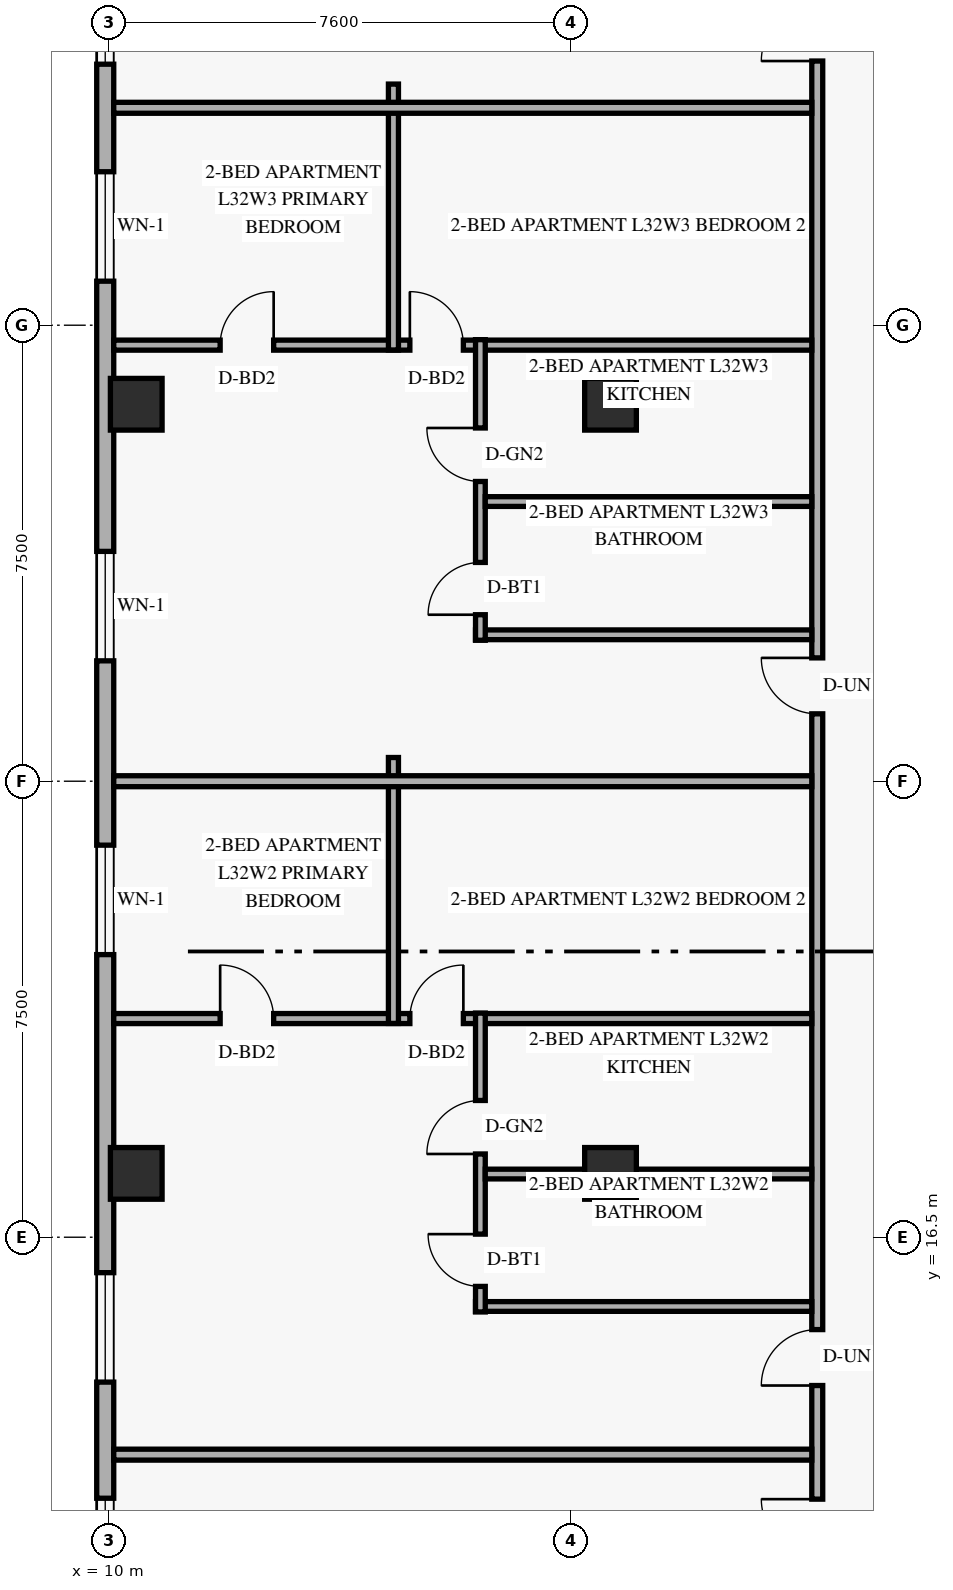
"""IFC4 building model, lengths in metres.
Left out: names, types, materials, properties, quantities, classifications, styles, units other than length and angle.
Written with IfcOpenShell. Run it as: python <this file> out.ifc"""

import sys

from ifc_helpers import new_model, si_unit, direction, frame, frame_2d, origin, origin_2d, place, context, subcontext, project, spatial, rectangle, extrude, element, fill, save


model = new_model("IFC4")
c1 = context("Model", 3, precision=1e-05, world=origin(), true_north=direction((0.0, 1.0)))
c2 = subcontext(c1, "Body", "Model", "MODEL_VIEW")
j1 = project(units=[si_unit("LENGTHUNIT", "METRE"), si_unit("PLANEANGLEUNIT", "RADIAN")], contexts=[c1])
p1 = place(None, origin())
s1 = spatial("IfcSite", under=j1, at=p1, CompositionType="ELEMENT")
p2 = place(p1, origin())
s2 = spatial("IfcBuilding", under=s1, at=p2, CompositionType="ELEMENT")
p3 = place(p2, frame((0.0, 0.0, 124.8)))
s3 = spatial("IfcBuildingStorey", under=s2, at=p3, CompositionType="ELEMENT", Elevation=124.8)
for number, where, z_axis, x_axis in (
    (1, (10.45, 17.55, 0.0), (0.0, 0.0, 1.0), (1.0, 0.0, 0.0)),
    (2, (10.45, 30.2, 0.0), (0.0, 0.0, 1.0), (1.0, 0.0, 0.0)),
    (3, (18.25, 17.55, 0.0), (0.0, 0.0, 1.0), (1.0, 0.0, 0.0)),
    (4, (18.25, 30.2, 0.0), (0.0, 0.0, 1.0), (1.0, 0.0, 0.0)),
):
    element("IfcColumn", number, at=place(p3, frame(where, z_axis=z_axis, x_axis=x_axis)), inside=s3, PredefinedType="COLUMN", context=c2, shape_type="SweptSolid", body=[
        extrude(rectangle(XDim=0.85, YDim=0.85, at=origin_2d()), origin(), (0.0, 0.0, 1.0), 3.6),
    ])
p4 = place(p3, frame((9.94, 41.68, 0.0), z_axis=(0.0, 0.0, 1.0), x_axis=(0.0, -1.0, 0.0)))
e5 = element("IfcWall", 5, at=p4, inside=s3, PredefinedType="SOLIDWALL", context=c2, shape_type="SweptSolid", body=[
    extrude(rectangle(XDim=35.36, YDim=0.28, at=frame_2d((17.68, 0.0))), origin(), (0.0, 0.0, 1.0), 3.36),
])
p5 = place(p4, frame((29.473, 0.0, 0.85)))
e6 = element("IfcOpeningElement", 6, at=p5, cuts=e5, PredefinedType="OPENING", context=c2, shape_type="SweptSolid", body=[
    extrude(rectangle(XDim=1.8, YDim=1.6, at=frame_2d((0.9, 0.8))), frame((0.0, 0.15, 0.0), z_axis=(0.0, -1.0, 0.0), x_axis=(1.0, 0.0, 0.0)), (0.0, 0.0, 1.0), 0.3),
])
p6 = place(p4, frame((25.763, 0.0, 0.85)))
e7 = element("IfcOpeningElement", 7, at=p6, cuts=e5, PredefinedType="OPENING", context=c2, shape_type="SweptSolid", body=[
    extrude(rectangle(XDim=1.8, YDim=1.6, at=frame_2d((0.9, 0.8))), frame((0.0, 0.15, 0.0), z_axis=(0.0, -1.0, 0.0), x_axis=(1.0, 0.0, 0.0)), (0.0, 0.0, 1.0), 0.3),
])
p7 = place(p4, frame((18.732, 0.0, 0.85)))
e8 = element("IfcOpeningElement", 8, at=p7, cuts=e5, PredefinedType="OPENING", context=c2, shape_type="SweptSolid", body=[
    extrude(rectangle(XDim=1.8, YDim=1.6, at=frame_2d((0.9, 0.8))), frame((0.0, 0.15, 0.0), z_axis=(0.0, -1.0, 0.0), x_axis=(1.0, 0.0, 0.0)), (0.0, 0.0, 1.0), 0.3),
])
p8 = place(p4, frame((13.9, 0.0, 0.85)))
e9 = element("IfcOpeningElement", 9, at=p8, cuts=e5, PredefinedType="OPENING", context=c2, shape_type="SweptSolid", body=[
    extrude(rectangle(XDim=1.8, YDim=1.6, at=frame_2d((0.9, 0.8))), frame((0.0, 0.15, 0.0), z_axis=(0.0, -1.0, 0.0), x_axis=(1.0, 0.0, 0.0)), (0.0, 0.0, 1.0), 0.3),
])
p9 = place(p4, frame((7.656, 0.0, 0.85)))
e10 = element("IfcOpeningElement", 10, at=p9, cuts=e5, PredefinedType="OPENING", context=c2, shape_type="SweptSolid", body=[
    extrude(rectangle(XDim=1.8, YDim=1.6, at=frame_2d((0.9, 0.8))), frame((0.0, 0.15, 0.0), z_axis=(0.0, -1.0, 0.0), x_axis=(1.0, 0.0, 0.0)), (0.0, 0.0, 1.0), 0.3),
])
p10 = place(p4, frame((4.087, 0.0, 0.85)))
e11 = element("IfcOpeningElement", 11, at=p10, cuts=e5, PredefinedType="OPENING", context=c2, shape_type="SweptSolid", body=[
    extrude(rectangle(XDim=1.8, YDim=1.6, at=frame_2d((0.9, 0.8))), frame((0.0, 0.15, 0.0), z_axis=(0.0, -1.0, 0.0), x_axis=(1.0, 0.0, 0.0)), (0.0, 0.0, 1.0), 0.3),
])
p11 = place(p3, frame((21.65, 6.8, 0.0), z_axis=(0.0, 0.0, 1.0), x_axis=(0.0, 1.0, 0.0)))
e12 = element("IfcWall", 12, at=p11, inside=s3, PredefinedType="STANDARD", context=c2, shape_type="SweptSolid", body=[
    extrude(rectangle(XDim=34.4, YDim=0.18, at=frame_2d((17.2, 0.0))), origin(), (0.0, 0.0, 1.0), 2.731),
])
p12 = place(p11, frame((4.472, 0.0, 0.0)))
e13 = element("IfcOpeningElement", 13, at=p12, cuts=e12, PredefinedType="OPENING", context=c2, shape_type="SweptSolid", body=[
    extrude(rectangle(XDim=0.92, YDim=2.15, at=frame_2d((0.46, 1.075))), frame((0.0, 0.1, 0.0), z_axis=(0.0, -1.0, 0.0), x_axis=(1.0, 0.0, 0.0)), (0.0, 0.0, 1.0), 0.2),
])
p13 = place(p11, frame((7.261, 0.0, 0.0)))
e14 = element("IfcOpeningElement", 14, at=p13, cuts=e12, PredefinedType="OPENING", context=c2, shape_type="SweptSolid", body=[
    extrude(rectangle(XDim=0.92, YDim=2.15, at=frame_2d((0.46, 1.075))), frame((0.0, 0.1, 0.0), z_axis=(0.0, -1.0, 0.0), x_axis=(1.0, 0.0, 0.0)), (0.0, 0.0, 1.0), 0.2),
])
p14 = place(p11, frame((18.308, 0.0, 0.0)))
e15 = element("IfcOpeningElement", 15, at=p14, cuts=e12, PredefinedType="OPENING", context=c2, shape_type="SweptSolid", body=[
    extrude(rectangle(XDim=0.92, YDim=2.15, at=frame_2d((0.46, 1.075))), frame((0.0, 0.1, 0.0), z_axis=(0.0, -1.0, 0.0), x_axis=(1.0, 0.0, 0.0)), (0.0, 0.0, 1.0), 0.2),
])
p15 = place(p11, frame((29.045, 0.0, 0.0)))
e16 = element("IfcOpeningElement", 16, at=p15, cuts=e12, PredefinedType="OPENING", context=c2, shape_type="SweptSolid", body=[
    extrude(rectangle(XDim=0.92, YDim=2.15, at=frame_2d((0.46, 1.075))), frame((0.0, 0.1, 0.0), z_axis=(0.0, -1.0, 0.0), x_axis=(1.0, 0.0, 0.0)), (0.0, 0.0, 1.0), 0.2),
])
p16 = place(p3, frame((10.08, 12.924, 0.0), z_axis=(0.0, 0.0, 1.0), x_axis=(1.0, 0.0, 0.0)))
e17 = element("IfcWall", 17, at=p16, inside=s3, PredefinedType="PARTITIONING", context=c2, shape_type="SweptSolid", body=[
    extrude(rectangle(XDim=11.48, YDim=0.18, at=frame_2d((5.74, 0.0))), origin(), (0.0, 0.0, 1.0), 2.731),
])
p17 = place(p3, frame((10.08, 20.096, 0.0), z_axis=(0.0, 0.0, 1.0), x_axis=(1.0, 0.0, 0.0)))
e18 = element("IfcWall", 18, at=p17, inside=s3, PredefinedType="PARTITIONING", context=c2, shape_type="SweptSolid", body=[
    extrude(rectangle(XDim=11.48, YDim=0.165, at=frame_2d((5.74, 0.0))), origin(), (0.0, 0.0, 1.0), 2.731),
])
p18 = place(p17, frame((1.75, 0.0, 0.0)))
e19 = element("IfcOpeningElement", 19, at=p18, cuts=e18, PredefinedType="OPENING", context=c2, shape_type="SweptSolid", body=[
    extrude(rectangle(XDim=0.88, YDim=2.14, at=frame_2d((0.44, 1.07))), frame((0.0, 0.093, 0.0), z_axis=(0.0, -1.0, 0.0), x_axis=(1.0, 0.0, 0.0)), (0.0, 0.0, 1.0), 0.185),
])
p19 = place(p17, frame((4.87, 0.0, 0.0)))
e20 = element("IfcOpeningElement", 20, at=p19, cuts=e18, PredefinedType="OPENING", context=c2, shape_type="SweptSolid", body=[
    extrude(rectangle(XDim=0.88, YDim=2.14, at=frame_2d((0.44, 1.07))), frame((0.0, 0.093, 0.0), z_axis=(0.0, -1.0, 0.0), x_axis=(1.0, 0.0, 0.0)), (0.0, 0.0, 1.0), 0.185),
])
p20 = place(p3, frame((16.03, 15.361, 0.0), z_axis=(0.0, 0.0, 1.0), x_axis=(1.0, 0.0, 0.0)))
e21 = element("IfcWall", 21, at=p20, inside=s3, PredefinedType="PLUMBINGWALL", context=c2, shape_type="SweptSolid", body=[
    extrude(rectangle(XDim=5.53, YDim=0.16, at=frame_2d((2.765, 0.0))), origin(), (0.0, 0.0, 1.0), 2.731),
])
p21 = place(p3, frame((16.11, 15.271, 0.0), z_axis=(0.0, 0.0, 1.0), x_axis=(0.0, 1.0, 0.0)))
e22 = element("IfcWall", 22, at=p21, inside=s3, PredefinedType="PLUMBINGWALL", context=c2, shape_type="SweptSolid", body=[
    extrude(rectangle(XDim=4.915, YDim=0.16, at=frame_2d((2.458, 0.0))), origin(), (0.0, 0.0, 1.0), 2.731),
])
p22 = place(p21, frame((0.42, 0.0, 0.0)))
e23 = element("IfcOpeningElement", 23, at=p22, cuts=e22, PredefinedType="OPENING", context=c2, shape_type="SweptSolid", body=[
    extrude(rectangle(XDim=0.86, YDim=2.12, at=frame_2d((0.43, 1.06))), frame((0.0, 0.09, 0.0), z_axis=(0.0, -1.0, 0.0), x_axis=(1.0, 0.0, 0.0)), (0.0, 0.0, 1.0), 0.18),
])
p23 = place(p21, frame((2.598, 0.0, 0.0)))
e24 = element("IfcOpeningElement", 24, at=p23, cuts=e22, PredefinedType="OPENING", context=c2, shape_type="SweptSolid", body=[
    extrude(rectangle(XDim=0.88, YDim=2.12, at=frame_2d((0.44, 1.06))), frame((0.0, 0.09, 0.0), z_axis=(0.0, -1.0, 0.0), x_axis=(1.0, 0.0, 0.0)), (0.0, 0.0, 1.0), 0.18),
])
p24 = place(p3, frame((16.19, 17.539, 0.0), z_axis=(0.0, 0.0, 1.0), x_axis=(1.0, 0.0, 0.0)))
e25 = element("IfcWall", 25, at=p24, inside=s3, PredefinedType="PLUMBINGWALL", context=c2, shape_type="SweptSolid", body=[
    extrude(rectangle(XDim=5.37, YDim=0.16, at=frame_2d((2.685, 0.0))), origin(), (0.0, 0.0, 1.0), 2.731),
])
p25 = place(p3, frame((14.68, 20.016, 0.0), z_axis=(0.0, 0.0, 1.0), x_axis=(0.0, 1.0, 0.0)))
e26 = element("IfcWall", 26, at=p25, inside=s3, PredefinedType="PARTITIONING", context=c2, shape_type="SweptSolid", body=[
    extrude(rectangle(XDim=4.374, YDim=0.165, at=frame_2d((2.187, 0.0))), origin(), (0.0, 0.0, 1.0), 3.36),
])
p26 = place(p3, frame((10.08, 24.0, 0.0), z_axis=(0.0, 0.0, 1.0), x_axis=(1.0, 0.0, 0.0)))
e27 = element("IfcWall", 27, at=p26, inside=s3, PredefinedType="PARTITIONING", context=c2, shape_type="SweptSolid", body=[
    extrude(rectangle(XDim=11.48, YDim=0.18, at=frame_2d((5.74, 0.0))), origin(), (0.0, 0.0, 1.0), 2.731),
])
p27 = place(p3, frame((10.08, 31.172, 0.0), z_axis=(0.0, 0.0, 1.0), x_axis=(1.0, 0.0, 0.0)))
e28 = element("IfcWall", 28, at=p27, inside=s3, PredefinedType="PARTITIONING", context=c2, shape_type="SweptSolid", body=[
    extrude(rectangle(XDim=11.48, YDim=0.165, at=frame_2d((5.74, 0.0))), origin(), (0.0, 0.0, 1.0), 2.731),
])
p28 = place(p27, frame((1.75, 0.0, 0.0)))
e29 = element("IfcOpeningElement", 29, at=p28, cuts=e28, PredefinedType="OPENING", context=c2, shape_type="SweptSolid", body=[
    extrude(rectangle(XDim=0.88, YDim=2.14, at=frame_2d((0.44, 1.07))), frame((0.0, 0.093, 0.0), z_axis=(0.0, -1.0, 0.0), x_axis=(1.0, 0.0, 0.0)), (0.0, 0.0, 1.0), 0.185),
])
p29 = place(p27, frame((4.87, 0.0, 0.0)))
e30 = element("IfcOpeningElement", 30, at=p29, cuts=e28, PredefinedType="OPENING", context=c2, shape_type="SweptSolid", body=[
    extrude(rectangle(XDim=0.88, YDim=2.14, at=frame_2d((0.44, 1.07))), frame((0.0, 0.093, 0.0), z_axis=(0.0, -1.0, 0.0), x_axis=(1.0, 0.0, 0.0)), (0.0, 0.0, 1.0), 0.185),
])
p30 = place(p3, frame((16.03, 26.408, 0.0), z_axis=(0.0, 0.0, 1.0), x_axis=(1.0, 0.0, 0.0)))
e31 = element("IfcWall", 31, at=p30, inside=s3, PredefinedType="PLUMBINGWALL", context=c2, shape_type="SweptSolid", body=[
    extrude(rectangle(XDim=5.53, YDim=0.16, at=frame_2d((2.765, 0.0))), origin(), (0.0, 0.0, 1.0), 2.731),
])
p31 = place(p3, frame((16.11, 26.318, 0.0), z_axis=(0.0, 0.0, 1.0), x_axis=(0.0, 1.0, 0.0)))
e32 = element("IfcWall", 32, at=p31, inside=s3, PredefinedType="PLUMBINGWALL", context=c2, shape_type="SweptSolid", body=[
    extrude(rectangle(XDim=4.944, YDim=0.16, at=frame_2d((2.472, 0.0))), origin(), (0.0, 0.0, 1.0), 2.731),
])
p32 = place(p31, frame((0.42, 0.0, 0.0)))
e33 = element("IfcOpeningElement", 33, at=p32, cuts=e32, PredefinedType="OPENING", context=c2, shape_type="SweptSolid", body=[
    extrude(rectangle(XDim=0.86, YDim=2.12, at=frame_2d((0.43, 1.06))), frame((0.0, 0.09, 0.0), z_axis=(0.0, -1.0, 0.0), x_axis=(1.0, 0.0, 0.0)), (0.0, 0.0, 1.0), 0.18),
])
p33 = place(p31, frame((2.611, 0.0, 0.0)))
e34 = element("IfcOpeningElement", 34, at=p33, cuts=e32, PredefinedType="OPENING", context=c2, shape_type="SweptSolid", body=[
    extrude(rectangle(XDim=0.88, YDim=2.12, at=frame_2d((0.44, 1.06))), frame((0.0, 0.09, 0.0), z_axis=(0.0, -1.0, 0.0), x_axis=(1.0, 0.0, 0.0)), (0.0, 0.0, 1.0), 0.18),
])
p34 = place(p3, frame((16.19, 28.6, 0.0), z_axis=(0.0, 0.0, 1.0), x_axis=(1.0, 0.0, 0.0)))
e35 = element("IfcWall", 35, at=p34, inside=s3, PredefinedType="PLUMBINGWALL", context=c2, shape_type="SweptSolid", body=[
    extrude(rectangle(XDim=5.37, YDim=0.16, at=frame_2d((2.685, 0.0))), origin(), (0.0, 0.0, 1.0), 2.731),
])
p35 = place(p3, frame((14.68, 31.092, 0.0), z_axis=(0.0, 0.0, 1.0), x_axis=(0.0, 1.0, 0.0)))
e36 = element("IfcWall", 36, at=p35, inside=s3, PredefinedType="PARTITIONING", context=c2, shape_type="SweptSolid", body=[
    extrude(rectangle(XDim=4.374, YDim=0.165, at=frame_2d((2.187, 0.0))), origin(), (0.0, 0.0, 1.0), 2.988),
])
p36 = place(p3, frame((10.08, 35.076, 0.0), z_axis=(0.0, 0.0, 1.0), x_axis=(1.0, 0.0, 0.0)))
e37 = element("IfcWall", 37, at=p36, inside=s3, PredefinedType="PARTITIONING", context=c2, shape_type="SweptSolid", body=[
    extrude(rectangle(XDim=11.48, YDim=0.18, at=frame_2d((5.74, 0.0))), origin(), (0.0, 0.0, 1.0), 2.731),
])
p37 = place(p5, origin())
e38 = element("IfcWindow", 38, at=p37, inside=s3, PartitioningType="SINGLE_PANEL", PredefinedType="WINDOW", context=c2, shape_type="SweptSolid", body=[
    extrude(rectangle(XDim=1.8, YDim=1.6, at=frame_2d((0.9, 0.8))), frame((0.0, 0.03, 0.0), z_axis=(0.0, -1.0, 0.0), x_axis=(1.0, 0.0, 0.0)), (0.0, 0.0, 1.0), 0.06),
])
fill(e6, e38)
p38 = place(p6, origin())
e39 = element("IfcWindow", 39, at=p38, inside=s3, PartitioningType="SINGLE_PANEL", PredefinedType="WINDOW", context=c2, shape_type="SweptSolid", body=[
    extrude(rectangle(XDim=1.8, YDim=1.6, at=frame_2d((0.9, 0.8))), frame((0.0, 0.03, 0.0), z_axis=(0.0, -1.0, 0.0), x_axis=(1.0, 0.0, 0.0)), (0.0, 0.0, 1.0), 0.06),
])
fill(e7, e39)
p39 = place(p7, origin())
e40 = element("IfcWindow", 40, at=p39, inside=s3, PartitioningType="SINGLE_PANEL", PredefinedType="WINDOW", context=c2, shape_type="SweptSolid", body=[
    extrude(rectangle(XDim=1.8, YDim=1.6, at=frame_2d((0.9, 0.8))), frame((0.0, 0.03, 0.0), z_axis=(0.0, -1.0, 0.0), x_axis=(1.0, 0.0, 0.0)), (0.0, 0.0, 1.0), 0.06),
])
fill(e8, e40)
p40 = place(p8, origin())
e41 = element("IfcWindow", 41, at=p40, inside=s3, PartitioningType="SINGLE_PANEL", PredefinedType="WINDOW", context=c2, shape_type="SweptSolid", body=[
    extrude(rectangle(XDim=1.8, YDim=1.6, at=frame_2d((0.9, 0.8))), frame((0.0, 0.03, 0.0), z_axis=(0.0, -1.0, 0.0), x_axis=(1.0, 0.0, 0.0)), (0.0, 0.0, 1.0), 0.06),
])
fill(e9, e41)
p41 = place(p9, origin())
e42 = element("IfcWindow", 42, at=p41, inside=s3, PartitioningType="SINGLE_PANEL", PredefinedType="WINDOW", context=c2, shape_type="SweptSolid", body=[
    extrude(rectangle(XDim=1.8, YDim=1.6, at=frame_2d((0.9, 0.8))), frame((0.0, 0.03, 0.0), z_axis=(0.0, -1.0, 0.0), x_axis=(1.0, 0.0, 0.0)), (0.0, 0.0, 1.0), 0.06),
])
fill(e10, e42)
p42 = place(p10, origin())
e43 = element("IfcWindow", 43, at=p42, inside=s3, PartitioningType="SINGLE_PANEL", PredefinedType="WINDOW", context=c2, shape_type="SweptSolid", body=[
    extrude(rectangle(XDim=1.8, YDim=1.6, at=frame_2d((0.9, 0.8))), frame((0.0, 0.03, 0.0), z_axis=(0.0, -1.0, 0.0), x_axis=(1.0, 0.0, 0.0)), (0.0, 0.0, 1.0), 0.06),
])
fill(e11, e43)
p43 = place(p12, origin())
e44 = element("IfcDoor", 44, at=p43, inside=s3, OperationType="SINGLE_SWING_RIGHT", PredefinedType="DOOR", context=c2, shape_type="SweptSolid", body=[
    extrude(rectangle(XDim=0.92, YDim=2.15, at=frame_2d((0.46, 1.075))), frame((0.0, 0.025, 0.0), z_axis=(0.0, -1.0, 0.0), x_axis=(1.0, 0.0, 0.0)), (0.0, 0.0, 1.0), 0.05),
])
fill(e13, e44)
p44 = place(p13, origin())
e45 = element("IfcDoor", 45, at=p44, inside=s3, OperationType="SINGLE_SWING_LEFT", PredefinedType="DOOR", context=c2, shape_type="SweptSolid", body=[
    extrude(rectangle(XDim=0.92, YDim=2.15, at=frame_2d((0.46, 1.075))), frame((0.0, 0.025, 0.0), z_axis=(0.0, -1.0, 0.0), x_axis=(1.0, 0.0, 0.0)), (0.0, 0.0, 1.0), 0.05),
])
fill(e14, e45)
p45 = place(p22, origin())
e46 = element("IfcDoor", 46, at=p45, inside=s3, OperationType="SINGLE_SWING_RIGHT", PredefinedType="DOOR", context=c2, shape_type="SweptSolid", body=[
    extrude(rectangle(XDim=0.86, YDim=2.12, at=frame_2d((0.43, 1.06))), frame((0.0, 0.025, 0.0), z_axis=(0.0, -1.0, 0.0), x_axis=(1.0, 0.0, 0.0)), (0.0, 0.0, 1.0), 0.05),
])
fill(e23, e46)
p46 = place(p23, origin())
e47 = element("IfcDoor", 47, at=p46, inside=s3, OperationType="SINGLE_SWING_LEFT", PredefinedType="DOOR", context=c2, shape_type="SweptSolid", body=[
    extrude(rectangle(XDim=0.88, YDim=2.12, at=frame_2d((0.44, 1.06))), frame((0.0, 0.025, 0.0), z_axis=(0.0, -1.0, 0.0), x_axis=(1.0, 0.0, 0.0)), (0.0, 0.0, 1.0), 0.05),
])
fill(e24, e47)
p47 = place(p18, origin())
e48 = element("IfcDoor", 48, at=p47, inside=s3, OperationType="SINGLE_SWING_LEFT", PredefinedType="DOOR", context=c2, shape_type="SweptSolid", body=[
    extrude(rectangle(XDim=0.88, YDim=2.14, at=frame_2d((0.44, 1.07))), frame((0.0, 0.025, 0.0), z_axis=(0.0, -1.0, 0.0), x_axis=(1.0, 0.0, 0.0)), (0.0, 0.0, 1.0), 0.05),
])
fill(e19, e48)
p48 = place(p19, origin())
e49 = element("IfcDoor", 49, at=p48, inside=s3, OperationType="SINGLE_SWING_RIGHT", PredefinedType="DOOR", context=c2, shape_type="SweptSolid", body=[
    extrude(rectangle(XDim=0.88, YDim=2.14, at=frame_2d((0.44, 1.07))), frame((0.0, 0.025, 0.0), z_axis=(0.0, -1.0, 0.0), x_axis=(1.0, 0.0, 0.0)), (0.0, 0.0, 1.0), 0.05),
])
fill(e20, e49)
p49 = place(p14, origin())
e50 = element("IfcDoor", 50, at=p49, inside=s3, OperationType="SINGLE_SWING_RIGHT", PredefinedType="DOOR", context=c2, shape_type="SweptSolid", body=[
    extrude(rectangle(XDim=0.92, YDim=2.15, at=frame_2d((0.46, 1.075))), frame((0.0, 0.025, 0.0), z_axis=(0.0, -1.0, 0.0), x_axis=(1.0, 0.0, 0.0)), (0.0, 0.0, 1.0), 0.05),
])
fill(e15, e50)
p50 = place(p32, origin())
e51 = element("IfcDoor", 51, at=p50, inside=s3, OperationType="SINGLE_SWING_LEFT", PredefinedType="DOOR", context=c2, shape_type="SweptSolid", body=[
    extrude(rectangle(XDim=0.86, YDim=2.12, at=frame_2d((0.43, 1.06))), frame((0.0, 0.025, 0.0), z_axis=(0.0, -1.0, 0.0), x_axis=(1.0, 0.0, 0.0)), (0.0, 0.0, 1.0), 0.05),
])
fill(e33, e51)
p51 = place(p33, origin())
e52 = element("IfcDoor", 52, at=p51, inside=s3, OperationType="SINGLE_SWING_RIGHT", PredefinedType="DOOR", context=c2, shape_type="SweptSolid", body=[
    extrude(rectangle(XDim=0.88, YDim=2.12, at=frame_2d((0.44, 1.06))), frame((0.0, 0.025, 0.0), z_axis=(0.0, -1.0, 0.0), x_axis=(1.0, 0.0, 0.0)), (0.0, 0.0, 1.0), 0.05),
])
fill(e34, e52)
p52 = place(p28, origin())
e53 = element("IfcDoor", 53, at=p52, inside=s3, OperationType="SINGLE_SWING_RIGHT", PredefinedType="DOOR", context=c2, shape_type="SweptSolid", body=[
    extrude(rectangle(XDim=0.88, YDim=2.14, at=frame_2d((0.44, 1.07))), frame((0.0, 0.025, 0.0), z_axis=(0.0, -1.0, 0.0), x_axis=(1.0, 0.0, 0.0)), (0.0, 0.0, 1.0), 0.05),
])
fill(e29, e53)
p53 = place(p29, origin())
e54 = element("IfcDoor", 54, at=p53, inside=s3, OperationType="SINGLE_SWING_LEFT", PredefinedType="DOOR", context=c2, shape_type="SweptSolid", body=[
    extrude(rectangle(XDim=0.88, YDim=2.14, at=frame_2d((0.44, 1.07))), frame((0.0, 0.025, 0.0), z_axis=(0.0, -1.0, 0.0), x_axis=(1.0, 0.0, 0.0)), (0.0, 0.0, 1.0), 0.05),
])
fill(e30, e54)
p54 = place(p15, origin())
e55 = element("IfcDoor", 55, at=p54, inside=s3, OperationType="SINGLE_SWING_LEFT", PredefinedType="DOOR", context=c2, shape_type="SweptSolid", body=[
    extrude(rectangle(XDim=0.92, YDim=2.15, at=frame_2d((0.46, 1.075))), frame((0.0, 0.025, 0.0), z_axis=(0.0, -1.0, 0.0), x_axis=(1.0, 0.0, 0.0)), (0.0, 0.0, 1.0), 0.05),
])
fill(e16, e55)
save(model, sys.argv[1])
